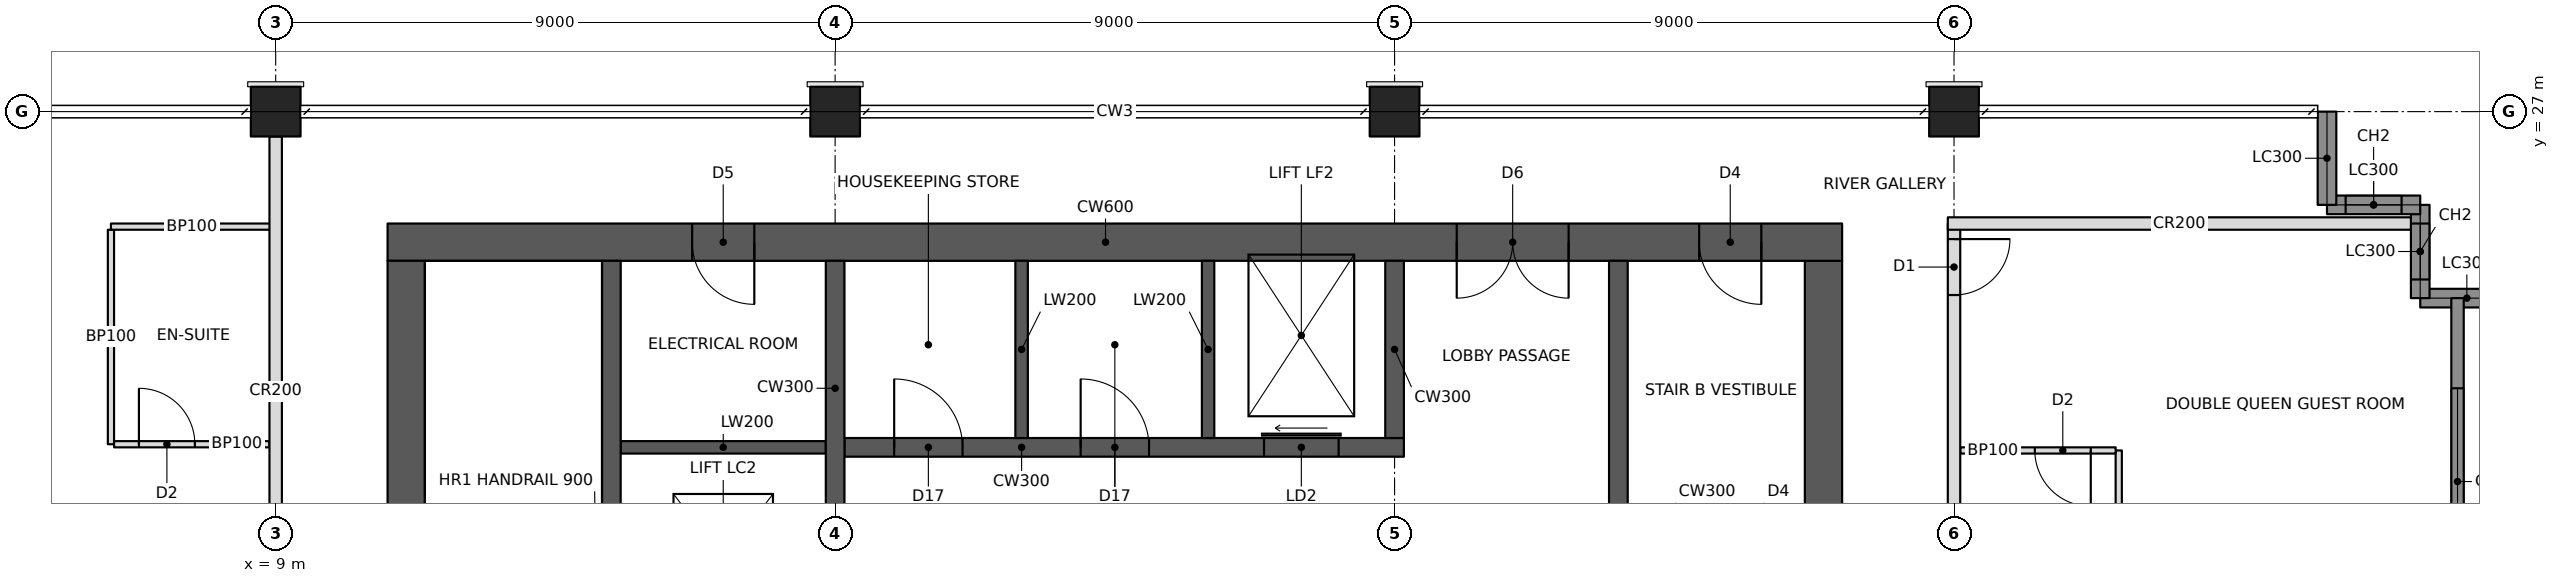
"""IFC4 building model, lengths in metres.
Left out: names, types, materials, properties, quantities, classifications, styles, units other than length and angle.
Written with IfcOpenShell. Run it as: python <this file> out.ifc"""

import sys

from ifc_helpers import new_model, si_unit, direction, frame, frame_2d, origin, origin_2d, place, context, subcontext, project, spatial, rectangle, hollow_rectangle, extrude, element, fill, save


model = new_model("IFC4")
c1 = context("Model", 3, precision=1e-05, world=origin(), true_north=direction((0.0, 1.0)))
c2 = subcontext(c1, "Body", "Model", "MODEL_VIEW")
j1 = project(units=[si_unit("LENGTHUNIT", "METRE"), si_unit("PLANEANGLEUNIT", "RADIAN")], contexts=[c1])
p1 = place(None, origin())
s1 = spatial("IfcSite", under=j1, at=p1, CompositionType="ELEMENT")
p2 = place(p1, origin())
s2 = spatial("IfcBuilding", under=s1, at=p2, CompositionType="ELEMENT")
p3 = place(p2, frame((0.0, 0.0, 214.8)))
s3 = spatial("IfcBuildingStorey", under=s2, at=p3, CompositionType="ELEMENT", Elevation=214.8)
for number, where, z_axis, x_axis in (
    (1, (9.0, 27.0, 0.0), (0.0, 0.0, 1.0), (1.0, 0.0, 0.0)),
    (2, (18.0, 27.0, 0.0), (0.0, 0.0, 1.0), (1.0, 0.0, 0.0)),
    (3, (27.0, 27.0, 0.0), (0.0, 0.0, 1.0), (1.0, 0.0, 0.0)),
    (4, (36.0, 27.0, 0.0), (0.0, 0.0, 1.0), (1.0, 0.0, 0.0)),
):
    element("IfcColumn", number, at=place(p3, frame(where, z_axis=z_axis, x_axis=x_axis)), inside=s3, PredefinedType="COLUMN", context=c2, shape_type="SweptSolid", body=[
        extrude(hollow_rectangle(XDim=0.8, YDim=0.8, WallThickness=0.06, at=origin_2d()), origin(), (0.0, 0.0, 1.0), 3.4),
    ])
p4 = place(p3, frame((10.8, 24.9, 0.0), z_axis=(0.0, 0.0, 1.0), x_axis=(1.0, 0.0, 0.0)))
e5 = element("IfcWall", 5, at=p4, inside=s3, PredefinedType="SHEAR", context=c2, shape_type="SweptSolid", body=[
    extrude(rectangle(XDim=23.4, YDim=0.6, at=frame_2d((11.7, 0.0))), origin(), (0.0, 0.0, 1.0), 3.4),
])
p5 = place(p4, frame((17.2, 0.0, 0.0)))
e6 = element("IfcOpeningElement", 6, at=p5, cuts=e5, PredefinedType="OPENING", context=c2, shape_type="SweptSolid", body=[
    extrude(rectangle(XDim=1.8, YDim=2.1, at=frame_2d((0.9, 1.05))), frame((0.0, 0.31, 0.0), z_axis=(0.0, -1.0, 0.0), x_axis=(1.0, 0.0, 0.0)), (0.0, 0.0, 1.0), 0.62),
])
p6 = place(p4, frame((21.1, 0.0, 0.0)))
e7 = element("IfcOpeningElement", 7, at=p6, cuts=e5, PredefinedType="OPENING", context=c2, shape_type="SweptSolid", body=[
    extrude(rectangle(XDim=1.0, YDim=2.1, at=frame_2d((0.5, 1.05))), frame((0.0, 0.31, 0.0), z_axis=(0.0, -1.0, 0.0), x_axis=(1.0, 0.0, 0.0)), (0.0, 0.0, 1.0), 0.62),
])
p7 = place(p4, frame((4.9, 0.0, 0.0)))
e8 = element("IfcOpeningElement", 8, at=p7, cuts=e5, PredefinedType="OPENING", context=c2, shape_type="SweptSolid", body=[
    extrude(rectangle(XDim=1.0, YDim=2.1, at=frame_2d((0.5, 1.05))), frame((0.0, 0.31, 0.0), z_axis=(0.0, -1.0, 0.0), x_axis=(1.0, 0.0, 0.0)), (0.0, 0.0, 1.0), 0.62),
])
for number, where, z_axis, x_axis in (
    (9, (11.1, 11.4, 0.0), (0.0, 0.0, 1.0), (0.0, 1.0, 0.0)),
    (10, (33.9, 11.4, 0.0), (0.0, 0.0, 1.0), (0.0, 1.0, 0.0)),
):
    element("IfcWall", number, at=place(p3, frame(where, z_axis=z_axis, x_axis=x_axis)), inside=s3, PredefinedType="SHEAR", context=c2, shape_type="SweptSolid", body=[
        extrude(rectangle(XDim=13.2, YDim=0.6, at=frame_2d((6.6, 0.0))), origin(), (0.0, 0.0, 1.0), 3.4),
    ])
p8 = place(p3, frame((14.4, 11.4, 0.0), z_axis=(0.0, 0.0, 1.0), x_axis=(0.0, 1.0, 0.0)))
e11 = element("IfcWall", 11, at=p8, inside=s3, PredefinedType="SHEAR", context=c2, shape_type="SweptSolid", body=[
    extrude(rectangle(XDim=13.2, YDim=0.3, at=frame_2d((6.6, 0.0))), origin(), (0.0, 0.0, 1.0), 3.4),
])
p9 = place(p3, frame((18.0, 11.4, 0.0), z_axis=(0.0, 0.0, 1.0), x_axis=(0.0, 1.0, 0.0)))
e12 = element("IfcWall", 12, at=p9, inside=s3, PredefinedType="SHEAR", context=c2, shape_type="SweptSolid", body=[
    extrude(rectangle(XDim=13.2, YDim=0.3, at=frame_2d((6.6, 0.0))), origin(), (0.0, 0.0, 1.0), 3.4),
])
p10 = place(p9, frame((3.6, 0.0, 0.0)))
e13 = element("IfcOpeningElement", 13, at=p10, cuts=e12, PredefinedType="OPENING", context=c2, shape_type="SweptSolid", body=[
    extrude(rectangle(XDim=1.0, YDim=2.1, at=frame_2d((0.5, 1.05))), frame((0.0, 0.16, 0.0), z_axis=(0.0, -1.0, 0.0), x_axis=(1.0, 0.0, 0.0)), (0.0, 0.0, 1.0), 0.32),
])
p11 = place(p9, frame((7.85, 0.0, 0.0)))
e14 = element("IfcOpeningElement", 14, at=p11, cuts=e12, PredefinedType="OPENING", context=c2, shape_type="SweptSolid", body=[
    extrude(rectangle(XDim=1.1, YDim=2.1, at=frame_2d((0.55, 1.05))), frame((0.0, 0.16, 0.0), z_axis=(0.0, -1.0, 0.0), x_axis=(1.0, 0.0, 0.0)), (0.0, 0.0, 1.0), 0.32),
])
p12 = place(p3, frame((18.15, 21.6, 0.0), z_axis=(0.0, 0.0, 1.0), x_axis=(1.0, 0.0, 0.0)))
e15 = element("IfcWall", 15, at=p12, inside=s3, PredefinedType="SHEAR", context=c2, shape_type="SweptSolid", body=[
    extrude(rectangle(XDim=9.0, YDim=0.3, at=frame_2d((4.5, 0.0))), origin(), (0.0, 0.0, 1.0), 3.4),
])
p13 = place(p12, frame((6.75, 0.0, 0.0)))
e16 = element("IfcOpeningElement", 16, at=p13, cuts=e15, PredefinedType="OPENING", context=c2, shape_type="SweptSolid", body=[
    extrude(rectangle(XDim=1.2, YDim=2.1, at=frame_2d((0.6, 1.05))), frame((0.0, 0.16, 0.0), z_axis=(0.0, -1.0, 0.0), x_axis=(1.0, 0.0, 0.0)), (0.0, 0.0, 1.0), 0.32),
])
p14 = place(p12, frame((0.8, 0.0, 0.0)))
e17 = element("IfcOpeningElement", 17, at=p14, cuts=e15, PredefinedType="OPENING", context=c2, shape_type="SweptSolid", body=[
    extrude(rectangle(XDim=1.1, YDim=2.1, at=frame_2d((0.55, 1.05))), frame((0.0, 0.16, 0.0), z_axis=(0.0, -1.0, 0.0), x_axis=(1.0, 0.0, 0.0)), (0.0, 0.0, 1.0), 0.32),
])
p15 = place(p12, frame((3.8, 0.0, 0.0)))
e18 = element("IfcOpeningElement", 18, at=p15, cuts=e15, PredefinedType="OPENING", context=c2, shape_type="SweptSolid", body=[
    extrude(rectangle(XDim=1.1, YDim=2.1, at=frame_2d((0.55, 1.05))), frame((0.0, 0.16, 0.0), z_axis=(0.0, -1.0, 0.0), x_axis=(1.0, 0.0, 0.0)), (0.0, 0.0, 1.0), 0.32),
])
p16 = place(p3, frame((27.0, 21.75, 0.0), z_axis=(0.0, 0.0, 1.0), x_axis=(0.0, 1.0, 0.0)))
e19 = element("IfcWall", 19, at=p16, inside=s3, PredefinedType="SHEAR", context=c2, shape_type="SweptSolid", body=[
    extrude(rectangle(XDim=2.85, YDim=0.3, at=frame_2d((1.425, 0.0))), origin(), (0.0, 0.0, 1.0), 3.4),
])
for number, where, z_axis, x_axis in (
    (20, (21.0, 21.75, 0.0), (0.0, 0.0, 1.0), (0.0, 1.0, 0.0)),
    (21, (24.0, 21.75, 0.0), (0.0, 0.0, 1.0), (0.0, 1.0, 0.0)),
):
    element("IfcWall", number, at=place(p3, frame(where, z_axis=z_axis, x_axis=x_axis)), inside=s3, PredefinedType="SHEAR", context=c2, shape_type="SweptSolid", body=[
        extrude(rectangle(XDim=2.85, YDim=0.2, at=frame_2d((1.425, 0.0))), origin(), (0.0, 0.0, 1.0), 3.4),
    ])
p17 = place(p3, frame((30.6, 11.4, 0.0), z_axis=(0.0, 0.0, 1.0), x_axis=(0.0, 1.0, 0.0)))
e22 = element("IfcWall", 22, at=p17, inside=s3, PredefinedType="SHEAR", context=c2, shape_type="SweptSolid", body=[
    extrude(rectangle(XDim=13.2, YDim=0.3, at=frame_2d((6.6, 0.0))), origin(), (0.0, 0.0, 1.0), 3.4),
])
p18 = place(p3, frame((14.55, 21.6, 0.0), z_axis=(0.0, 0.0, 1.0), x_axis=(1.0, 0.0, 0.0)))
e23 = element("IfcWall", 23, at=p18, inside=s3, PredefinedType="SHEAR", context=c2, shape_type="SweptSolid", body=[
    extrude(rectangle(XDim=3.3, YDim=0.2, at=frame_2d((1.65, 0.0))), origin(), (0.0, 0.0, 1.0), 3.4),
])
p19 = place(p3, frame((45.0, 24.0, 0.0), z_axis=(0.0, 0.0, 1.0), x_axis=(-1.0, 0.0, 0.0)))
e24 = element("IfcWall", 24, at=p19, inside=s3, PredefinedType="SOLIDWALL", context=c2, shape_type="SweptSolid", body=[
    extrude(rectangle(XDim=1.5, YDim=0.3, at=frame_2d((0.75, 0.0))), origin(), (0.0, 0.0, 1.0), 2.42),
])
p20 = place(p3, frame((43.5, 24.0, 0.0), z_axis=(0.0, 0.0, 1.0), x_axis=(0.0, 1.0, 0.0)))
e25 = element("IfcWall", 25, at=p20, inside=s3, PredefinedType="SOLIDWALL", context=c2, shape_type="SweptSolid", body=[
    extrude(rectangle(XDim=1.5, YDim=0.3, at=frame_2d((0.75, 0.0))), origin(), (0.0, 0.0, 1.0), 3.2),
])
p21 = place(p20, frame((0.3, 0.0, 0.6)))
e26 = element("IfcOpeningElement", 26, at=p21, cuts=e25, PredefinedType="OPENING", context=c2, shape_type="SweptSolid", body=[
    extrude(rectangle(XDim=0.9, YDim=2.2, at=frame_2d((0.45, 1.1))), frame((0.0, 0.16, 0.0), z_axis=(0.0, -1.0, 0.0), x_axis=(1.0, 0.0, 0.0)), (0.0, 0.0, 1.0), 0.32),
])
p22 = place(p3, frame((43.5, 25.5, 0.0), z_axis=(0.0, 0.0, 1.0), x_axis=(-1.0, 0.0, 0.0)))
e27 = element("IfcWall", 27, at=p22, inside=s3, PredefinedType="SOLIDWALL", context=c2, shape_type="SweptSolid", body=[
    extrude(rectangle(XDim=1.5, YDim=0.3, at=frame_2d((0.75, 0.0))), origin(), (0.0, 0.0, 1.0), 3.2),
])
p23 = place(p22, frame((0.3, 0.0, 0.6)))
e28 = element("IfcOpeningElement", 28, at=p23, cuts=e27, PredefinedType="OPENING", context=c2, shape_type="SweptSolid", body=[
    extrude(rectangle(XDim=0.9, YDim=2.2, at=frame_2d((0.45, 1.1))), frame((0.0, 0.16, 0.0), z_axis=(0.0, -1.0, 0.0), x_axis=(1.0, 0.0, 0.0)), (0.0, 0.0, 1.0), 0.32),
])
p24 = place(p3, frame((42.0, 25.5, 0.0), z_axis=(0.0, 0.0, 1.0), x_axis=(0.0, 1.0, 0.0)))
e29 = element("IfcWall", 29, at=p24, inside=s3, PredefinedType="SOLIDWALL", context=c2, shape_type="SweptSolid", body=[
    extrude(rectangle(XDim=1.5, YDim=0.3, at=frame_2d((0.75, 0.0))), origin(), (0.0, 0.0, 1.0), 2.42),
])
p25 = place(p3, frame((9.0, 18.4, 0.0), z_axis=(0.0, 0.0, 1.0), x_axis=(0.0, 1.0, 0.0)))
e30 = element("IfcWall", 30, at=p25, inside=s3, PredefinedType="PARTITIONING", context=c2, shape_type="SweptSolid", body=[
    extrude(rectangle(XDim=8.2, YDim=0.2, at=frame_2d((4.1, 0.0))), origin(), (0.0, 0.0, 1.0), 2.405),
])
p26 = place(p3, frame((36.0, 18.4, 0.0), z_axis=(0.0, 0.0, 1.0), x_axis=(0.0, 1.0, 0.0)))
e31 = element("IfcWall", 31, at=p26, inside=s3, PredefinedType="PARTITIONING", context=c2, shape_type="SweptSolid", body=[
    extrude(rectangle(XDim=6.8, YDim=0.2, at=frame_2d((3.4, 0.0))), origin(), (0.0, 0.0, 1.0), 2.405),
])
p27 = place(p26, frame((5.65, 0.0, 0.0)))
e32 = element("IfcOpeningElement", 32, at=p27, cuts=e31, PredefinedType="OPENING", context=c2, shape_type="SweptSolid", body=[
    extrude(rectangle(XDim=0.9, YDim=2.1, at=frame_2d((0.45, 1.05))), frame((0.0, 0.11, 0.0), z_axis=(0.0, -1.0, 0.0), x_axis=(1.0, 0.0, 0.0)), (0.0, 0.0, 1.0), 0.22),
])
p28 = place(p3, frame((35.9, 25.2, 0.0), z_axis=(0.0, 0.0, 1.0), x_axis=(1.0, 0.0, 0.0)))
e33 = element("IfcWall", 33, at=p28, inside=s3, PredefinedType="PARTITIONING", context=c2, shape_type="SweptSolid", body=[
    extrude(rectangle(XDim=7.45, YDim=0.2, at=frame_2d((3.725, 0.0))), origin(), (0.0, 0.0, 1.0), 2.404),
])
p29 = place(p3, frame((6.35, 21.65, 0.0), z_axis=(0.0, 0.0, 1.0), x_axis=(0.0, 1.0, 0.0)))
e34 = element("IfcWall", 34, at=p29, inside=s3, PredefinedType="PARTITIONING", context=c2, shape_type="SweptSolid", body=[
    extrude(rectangle(XDim=3.45, YDim=0.1, at=frame_2d((1.725, 0.0))), origin(), (0.0, 0.0, 1.0), 3.2),
])
p30 = place(p3, frame((8.9, 21.65, 0.0), z_axis=(0.0, 0.0, 1.0), x_axis=(-1.0, 0.0, 0.0)))
e35 = element("IfcWall", 35, at=p30, inside=s3, PredefinedType="PARTITIONING", context=c2, shape_type="SweptSolid", body=[
    extrude(rectangle(XDim=2.5, YDim=0.1, at=frame_2d((1.25, 0.0))), origin(), (0.0, 0.0, 1.0), 2.404),
])
p31 = place(p30, frame((1.2, 0.0, 0.0)))
e36 = element("IfcOpeningElement", 36, at=p31, cuts=e35, PredefinedType="OPENING", context=c2, shape_type="SweptSolid", body=[
    extrude(rectangle(XDim=0.9, YDim=2.1, at=frame_2d((0.45, 1.05))), frame((0.0, 0.06, 0.0), z_axis=(0.0, -1.0, 0.0), x_axis=(1.0, 0.0, 0.0)), (0.0, 0.0, 1.0), 0.12),
])
p32 = place(p3, frame((38.65, 18.1, 0.0), z_axis=(0.0, 0.0, 1.0), x_axis=(0.0, 1.0, 0.0)))
e37 = element("IfcWall", 37, at=p32, inside=s3, PredefinedType="PARTITIONING", context=c2, shape_type="SweptSolid", body=[
    extrude(rectangle(XDim=3.45, YDim=0.1, at=frame_2d((1.725, 0.0))), origin(), (0.0, 0.0, 1.0), 2.404),
])
p33 = place(p3, frame((36.1, 21.55, 0.0), z_axis=(0.0, 0.0, 1.0), x_axis=(1.0, 0.0, 0.0)))
e38 = element("IfcWall", 38, at=p33, inside=s3, PredefinedType="PARTITIONING", context=c2, shape_type="SweptSolid", body=[
    extrude(rectangle(XDim=2.5, YDim=0.1, at=frame_2d((1.25, 0.0))), origin(), (0.0, 0.0, 1.0), 2.404),
])
p34 = place(p33, frame((1.2, 0.0, 0.0)))
e39 = element("IfcOpeningElement", 39, at=p34, cuts=e38, PredefinedType="OPENING", context=c2, shape_type="SweptSolid", body=[
    extrude(rectangle(XDim=0.9, YDim=2.1, at=frame_2d((0.45, 1.05))), frame((0.0, 0.06, 0.0), z_axis=(0.0, -1.0, 0.0), x_axis=(1.0, 0.0, 0.0)), (0.0, 0.0, 1.0), 0.12),
])
p35 = place(p3, frame((6.35, 25.15, 0.0), z_axis=(0.0, 0.0, 1.0), x_axis=(1.0, 0.0, 0.0)))
e40 = element("IfcWall", 40, at=p35, inside=s3, PredefinedType="PARTITIONING", context=c2, shape_type="SweptSolid", body=[
    extrude(rectangle(XDim=2.6, YDim=0.1, at=frame_2d((1.3, 0.0))), origin(), (0.0, 0.0, 1.0), 2.404),
])
p36 = place(p3, frame((44.1, 18.194, 0.0), z_axis=(0.0, 0.0, 1.0), x_axis=(0.0, 1.0, 0.0)))
e41 = element("IfcWall", 41, at=p36, inside=s3, PredefinedType="SOLIDWALL", context=c2, shape_type="SweptSolid", body=[
    extrude(rectangle(XDim=5.806, YDim=0.2, at=frame_2d((2.903, 0.0))), origin(), (0.0, 0.0, 1.0), 3.2),
])
p37 = place(p36, frame((1.356, 0.0, 0.6)))
e42 = element("IfcOpeningElement", 42, at=p37, cuts=e41, PredefinedType="OPENING", context=c2, shape_type="SweptSolid", body=[
    extrude(rectangle(XDim=3.0, YDim=2.2, at=frame_2d((1.5, 1.1))), frame((0.0, 0.11, 0.0), z_axis=(0.0, -1.0, 0.0), x_axis=(1.0, 0.0, 0.0)), (0.0, 0.0, 1.0), 0.22),
])
p38 = place(p21, origin())
e43 = element("IfcWindow", 43, at=p38, inside=s3, PartitioningType="SINGLE_PANEL", PredefinedType="WINDOW", context=c2, shape_type="SweptSolid", body=[
    extrude(rectangle(XDim=0.9, YDim=2.2, at=frame_2d((0.45, 1.1))), frame((0.0, 0.03, 0.0), z_axis=(0.0, -1.0, 0.0), x_axis=(1.0, 0.0, 0.0)), (0.0, 0.0, 1.0), 0.06),
])
fill(e26, e43)
p39 = place(p23, origin())
e44 = element("IfcWindow", 44, at=p39, inside=s3, PartitioningType="SINGLE_PANEL", PredefinedType="WINDOW", context=c2, shape_type="SweptSolid", body=[
    extrude(rectangle(XDim=0.9, YDim=2.2, at=frame_2d((0.45, 1.1))), frame((0.0, 0.03, 0.0), z_axis=(0.0, -1.0, 0.0), x_axis=(1.0, 0.0, 0.0)), (0.0, 0.0, 1.0), 0.06),
])
fill(e28, e44)
p40 = place(p37, origin())
e45 = element("IfcWindow", 45, at=p40, inside=s3, PartitioningType="TRIPLE_PANEL_VERTICAL", PredefinedType="WINDOW", context=c2, shape_type="SweptSolid", body=[
    extrude(rectangle(XDim=3.0, YDim=2.2, at=frame_2d((1.5, 1.1))), frame((0.0, 0.03, 0.0), z_axis=(0.0, -1.0, 0.0), x_axis=(1.0, 0.0, 0.0)), (0.0, 0.0, 1.0), 0.06),
])
fill(e42, e45)
p41 = place(p31, frame((0.9, 0.0, 0.0), z_axis=(0.0, 0.0, 1.0), x_axis=(-1.0, 0.0, 0.0)))
e46 = element("IfcDoor", 46, at=p41, inside=s3, OperationType="SINGLE_SWING_LEFT", PredefinedType="DOOR", context=c2, shape_type="SweptSolid", body=[
    extrude(rectangle(XDim=0.9, YDim=2.1, at=frame_2d((0.45, 1.05))), frame((0.0, 0.025, 0.0), z_axis=(0.0, -1.0, 0.0), x_axis=(1.0, 0.0, 0.0)), (0.0, 0.0, 1.0), 0.05),
])
fill(e36, e46)
p42 = place(p34, frame((0.9, 0.0, 0.0), z_axis=(0.0, 0.0, 1.0), x_axis=(-1.0, 0.0, 0.0)))
e47 = element("IfcDoor", 47, at=p42, inside=s3, OperationType="SINGLE_SWING_LEFT", PredefinedType="DOOR", context=c2, shape_type="SweptSolid", body=[
    extrude(rectangle(XDim=0.9, YDim=2.1, at=frame_2d((0.45, 1.05))), frame((0.0, 0.025, 0.0), z_axis=(0.0, -1.0, 0.0), x_axis=(1.0, 0.0, 0.0)), (0.0, 0.0, 1.0), 0.05),
])
fill(e39, e47)
p43 = place(p27, frame((0.9, 0.0, 0.0), z_axis=(0.0, 0.0, 1.0), x_axis=(-1.0, 0.0, 0.0)))
e48 = element("IfcDoor", 48, at=p43, inside=s3, OperationType="SINGLE_SWING_LEFT", PredefinedType="DOOR", context=c2, shape_type="SweptSolid", body=[
    extrude(rectangle(XDim=0.9, YDim=2.1, at=frame_2d((0.45, 1.05))), frame((0.0, 0.025, 0.0), z_axis=(0.0, -1.0, 0.0), x_axis=(1.0, 0.0, 0.0)), (0.0, 0.0, 1.0), 0.05),
])
fill(e32, e48)
p44 = place(p5, frame((1.8, 0.0, 0.0), z_axis=(0.0, 0.0, 1.0), x_axis=(-1.0, 0.0, 0.0)))
e49 = element("IfcDoor", 49, at=p44, inside=s3, OperationType="DOUBLE_DOOR_SINGLE_SWING", PredefinedType="DOOR", context=c2, shape_type="SweptSolid", body=[
    extrude(rectangle(XDim=1.8, YDim=2.1, at=frame_2d((0.9, 1.05))), frame((0.0, 0.025, 0.0), z_axis=(0.0, -1.0, 0.0), x_axis=(1.0, 0.0, 0.0)), (0.0, 0.0, 1.0), 0.05),
])
fill(e6, e49)
p45 = place(p6, frame((1.0, 0.0, 0.0), z_axis=(0.0, 0.0, 1.0), x_axis=(-1.0, 0.0, 0.0)))
e50 = element("IfcDoor", 50, at=p45, inside=s3, OperationType="SINGLE_SWING_LEFT", PredefinedType="DOOR", context=c2, shape_type="SweptSolid", body=[
    extrude(rectangle(XDim=1.0, YDim=2.1, at=frame_2d((0.5, 1.05))), frame((0.0, 0.025, 0.0), z_axis=(0.0, -1.0, 0.0), x_axis=(1.0, 0.0, 0.0)), (0.0, 0.0, 1.0), 0.05),
])
fill(e7, e50)
p46 = place(p7, frame((1.0, 0.0, 0.0), z_axis=(0.0, 0.0, 1.0), x_axis=(-1.0, 0.0, 0.0)))
e51 = element("IfcDoor", 51, at=p46, inside=s3, OperationType="SINGLE_SWING_LEFT", PredefinedType="DOOR", context=c2, shape_type="SweptSolid", body=[
    extrude(rectangle(XDim=1.0, YDim=2.1, at=frame_2d((0.5, 1.05))), frame((0.0, 0.025, 0.0), z_axis=(0.0, -1.0, 0.0), x_axis=(1.0, 0.0, 0.0)), (0.0, 0.0, 1.0), 0.05),
])
fill(e8, e51)
p47 = place(p13, origin())
e52 = element("IfcDoor", 52, at=p47, inside=s3, OperationType="SLIDING_TO_LEFT", PredefinedType="DOOR", context=c2, shape_type="SweptSolid", body=[
    extrude(rectangle(XDim=1.2, YDim=2.1, at=frame_2d((0.6, 1.05))), frame((0.0, 0.025, 0.0), z_axis=(0.0, -1.0, 0.0), x_axis=(1.0, 0.0, 0.0)), (0.0, 0.0, 1.0), 0.05),
])
fill(e16, e52)
p48 = place(p14, origin())
e53 = element("IfcDoor", 53, at=p48, inside=s3, OperationType="SINGLE_SWING_LEFT", PredefinedType="DOOR", context=c2, shape_type="SweptSolid", body=[
    extrude(rectangle(XDim=1.1, YDim=2.1, at=frame_2d((0.55, 1.05))), frame((0.0, 0.025, 0.0), z_axis=(0.0, -1.0, 0.0), x_axis=(1.0, 0.0, 0.0)), (0.0, 0.0, 1.0), 0.05),
])
fill(e17, e53)
p49 = place(p15, origin())
e54 = element("IfcDoor", 54, at=p49, inside=s3, OperationType="SINGLE_SWING_LEFT", PredefinedType="DOOR", context=c2, shape_type="SweptSolid", body=[
    extrude(rectangle(XDim=1.1, YDim=2.1, at=frame_2d((0.55, 1.05))), frame((0.0, 0.025, 0.0), z_axis=(0.0, -1.0, 0.0), x_axis=(1.0, 0.0, 0.0)), (0.0, 0.0, 1.0), 0.05),
])
fill(e18, e54)
save(model, sys.argv[1])
